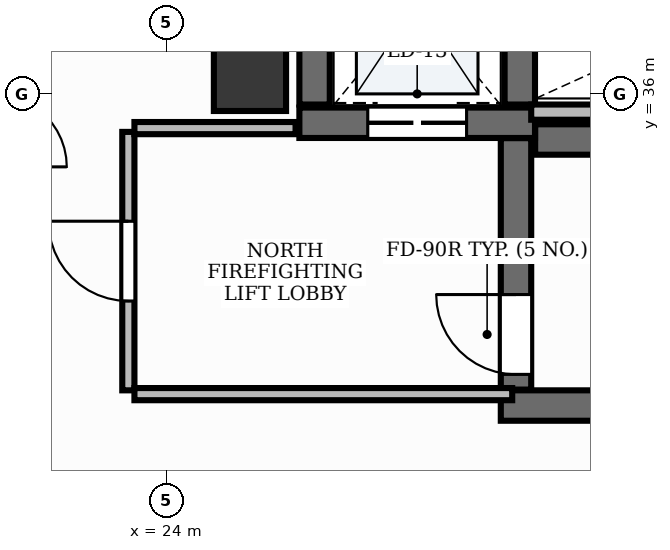
"""IFC4 building model, lengths in metres.
Left out: names, types, materials, properties, quantities, classifications, styles, units other than length and angle.
Written with IfcOpenShell. Run it as: python <this file> out.ifc"""

import sys

from ifc_helpers import new_model, si_unit, direction, frame, frame_2d, origin, origin_2d, place, context, subcontext, project, spatial, rectangle, extrude, element, fill, save


model = new_model("IFC4")
c1 = context("Model", 3, precision=1e-05, world=origin(), true_north=direction((0.0, 1.0)))
c2 = subcontext(c1, "Body", "Model", "MODEL_VIEW")
j1 = project(units=[si_unit("LENGTHUNIT", "METRE"), si_unit("PLANEANGLEUNIT", "RADIAN")], contexts=[c1])
p1 = place(None, origin())
s1 = spatial("IfcSite", under=j1, at=p1, CompositionType="ELEMENT")
p2 = place(p1, origin())
s2 = spatial("IfcBuilding", under=s1, at=p2, CompositionType="ELEMENT")
p3 = place(p2, frame((0.0, 0.0, 231.0)))
s3 = spatial("IfcBuildingStorey", under=s2, at=p3, CompositionType="ELEMENT", Elevation=231.0)
p4 = place(p3, frame((28.852, 35.4, 0.0), z_axis=(0.0, 0.0, 1.0), x_axis=(1.0, 0.0, 0.0)))
e1 = element("IfcWall", 1, at=p4, inside=s3, PredefinedType="SHEAR", context=c2, shape_type="SweptSolid", body=[
    extrude(rectangle(XDim=8.198, YDim=0.4, at=frame_2d((4.099, 0.0))), origin(), (0.0, 0.0, 1.0), 3.9),
])
p5 = place(p3, frame((28.4, 31.9, 0.0), z_axis=(0.0, 0.0, 1.0), x_axis=(1.0, 0.0, 0.0)))
e2 = element("IfcWall", 2, at=p5, inside=s3, PredefinedType="SHEAR", context=c2, shape_type="SweptSolid", body=[
    extrude(rectangle(XDim=8.65, YDim=0.4, at=frame_2d((4.325, 0.0))), origin(), (0.0, 0.0, 1.0), 3.9),
])
p6 = place(p3, frame((28.6, 32.11, 0.0), z_axis=(0.0, 0.0, 1.0), x_axis=(0.0, 1.0, 0.0)))
e3 = element("IfcWall", 3, at=p6, inside=s3, PredefinedType="SHEAR", context=c2, shape_type="SweptSolid", body=[
    extrude(rectangle(XDim=3.308, YDim=0.4, at=frame_2d((1.654, 0.0))), origin(), (0.0, 0.0, 1.0), 3.9),
])
p7 = place(p6, frame((0.2, 0.0, 0.0)))
e4 = element("IfcOpeningElement", 4, at=p7, cuts=e3, PredefinedType="OPENING", context=c2, shape_type="SweptSolid", body=[
    extrude(rectangle(XDim=1.05, YDim=2.15, at=frame_2d((0.525, 1.075))), frame((0.0, 0.215, 0.0), z_axis=(0.0, -1.0, 0.0), x_axis=(1.0, 0.0, 0.0)), (0.0, 0.0, 1.0), 0.43),
])
p8 = place(p3, frame((25.75, 35.62, 0.0), z_axis=(0.0, 0.0, 1.0), x_axis=(1.0, 0.0, 0.0)))
e5 = element("IfcWall", 5, at=p8, inside=s3, PredefinedType="SHEAR", context=c2, shape_type="SweptSolid", body=[
    extrude(rectangle(XDim=3.1, YDim=0.4, at=frame_2d((1.55, 0.0))), origin(), (0.0, 0.0, 1.0), 3.9),
])
p9 = place(p8, frame((0.9, 0.0, 0.0)))
e6 = element("IfcOpeningElement", 6, at=p9, cuts=e5, PredefinedType="OPENING", context=c2, shape_type="SweptSolid", body=[
    extrude(rectangle(XDim=1.3, YDim=2.2, at=frame_2d((0.65, 1.1))), frame((0.0, 0.215, 0.0), z_axis=(0.0, -1.0, 0.0), x_axis=(1.0, 0.0, 0.0)), (0.0, 0.0, 1.0), 0.43),
])
for number, where, z_axis, x_axis in (
    (7, (25.95, 35.86, 0.0), (0.0, 0.0, 1.0), (0.0, 1.0, 0.0)),
    (8, (28.65, 35.86, 0.0), (0.0, 0.0, 1.0), (0.0, 1.0, 0.0)),
):
    element("IfcWall", number, at=place(p3, frame(where, z_axis=z_axis, x_axis=x_axis)), inside=s3, PredefinedType="SHEAR", context=c2, shape_type="SweptSolid", body=[
        extrude(rectangle(XDim=2.7, YDim=0.4, at=frame_2d((1.35, 0.0))), origin(), (0.0, 0.0, 1.0), 3.9),
    ])
p10 = place(p3, frame((25.1, 36.25, -0.0), z_axis=(0.0, 0.0, 1.0), x_axis=(1.0, 0.0, 0.0)))
e9 = element("IfcColumn", 9, at=p10, inside=s3, PredefinedType="PILASTER", context=c2, shape_type="SweptSolid", body=[
    extrude(rectangle(XDim=0.95, YDim=0.95, at=origin_2d()), origin(), (0.0, 0.0, 1.0), 3.901),
])
p11 = place(p3, frame((28.8, 35.76, 0.0), z_axis=(0.0, 0.0, 1.0), x_axis=(1.0, 0.0, 0.0)))
e10 = element("IfcWall", 10, at=p11, inside=s3, PredefinedType="PARTITIONING", context=c2, shape_type="SweptSolid", body=[
    extrude(rectangle(XDim=4.57, YDim=0.2, at=frame_2d((2.285, 0.0))), origin(), (0.0, 0.0, 1.0), 2.91),
])
p12 = place(p3, frame((23.5, 32.1, 0.0), z_axis=(0.0, 0.0, 1.0), x_axis=(0.0, 1.0, 0.0)))
e11 = element("IfcWall", 11, at=p12, inside=s3, PredefinedType="PARTITIONING", context=c2, shape_type="SweptSolid", body=[
    extrude(rectangle(XDim=3.4, YDim=0.16, at=frame_2d((1.7, 0.0))), origin(), (0.0, 0.0, 1.0), 2.91),
])
p13 = place(p12, frame((1.175, 0.0, 0.0)))
e12 = element("IfcOpeningElement", 12, at=p13, cuts=e11, PredefinedType="OPENING", context=c2, shape_type="SweptSolid", body=[
    extrude(rectangle(XDim=1.05, YDim=2.15, at=frame_2d((0.525, 1.075))), frame((0.0, 0.095, 0.0), z_axis=(0.0, -1.0, 0.0), x_axis=(1.0, 0.0, 0.0)), (0.0, 0.0, 1.0), 0.19),
])
p14 = place(p3, frame((23.58, 32.05, 0.0), z_axis=(0.0, 0.0, 1.0), x_axis=(1.0, 0.0, 0.0)))
e13 = element("IfcWall", 13, at=p14, inside=s3, PredefinedType="PARTITIONING", context=c2, shape_type="SweptSolid", body=[
    extrude(rectangle(XDim=4.97, YDim=0.16, at=frame_2d((2.485, 0.0))), origin(), (0.0, 0.0, 1.0), 2.91),
])
p15 = place(p3, frame((23.58, 35.55, 0.0), z_axis=(0.0, 0.0, 1.0), x_axis=(1.0, 0.0, 0.0)))
e14 = element("IfcWall", 14, at=p15, inside=s3, PredefinedType="PARTITIONING", context=c2, shape_type="SweptSolid", body=[
    extrude(rectangle(XDim=2.12, YDim=0.16, at=frame_2d((1.06, 0.0))), origin(), (0.0, 0.0, 1.0), 2.91),
])
p16 = place(p7, origin())
e15 = element("IfcDoor", 15, at=p16, inside=s3, OperationType="SINGLE_SWING_RIGHT", PredefinedType="DOOR", context=c2, shape_type="SweptSolid", body=[
    extrude(rectangle(XDim=1.05, YDim=2.15, at=frame_2d((0.525, 1.075))), frame((0.0, 0.025, 0.0), z_axis=(0.0, -1.0, 0.0), x_axis=(1.0, 0.0, 0.0)), (0.0, 0.0, 1.0), 0.05),
])
fill(e4, e15)
p17 = place(p9, origin())
e16 = element("IfcDoor", 16, at=p17, inside=s3, OperationType="DOUBLE_DOOR_SLIDING", PredefinedType="DOOR", context=c2, shape_type="SweptSolid", body=[
    extrude(rectangle(XDim=1.3, YDim=2.2, at=frame_2d((0.65, 1.1))), frame((0.0, 0.025, 0.0), z_axis=(0.0, -1.0, 0.0), x_axis=(1.0, 0.0, 0.0)), (0.0, 0.0, 1.0), 0.05),
])
fill(e6, e16)
p18 = place(p13, origin())
e17 = element("IfcDoor", 17, at=p18, inside=s3, OperationType="SINGLE_SWING_RIGHT", PredefinedType="DOOR", context=c2, shape_type="SweptSolid", body=[
    extrude(rectangle(XDim=1.05, YDim=2.15, at=frame_2d((0.525, 1.075))), frame((0.0, 0.025, 0.0), z_axis=(0.0, -1.0, 0.0), x_axis=(1.0, 0.0, 0.0)), (0.0, 0.0, 1.0), 0.05),
])
fill(e12, e17)
save(model, sys.argv[1])
